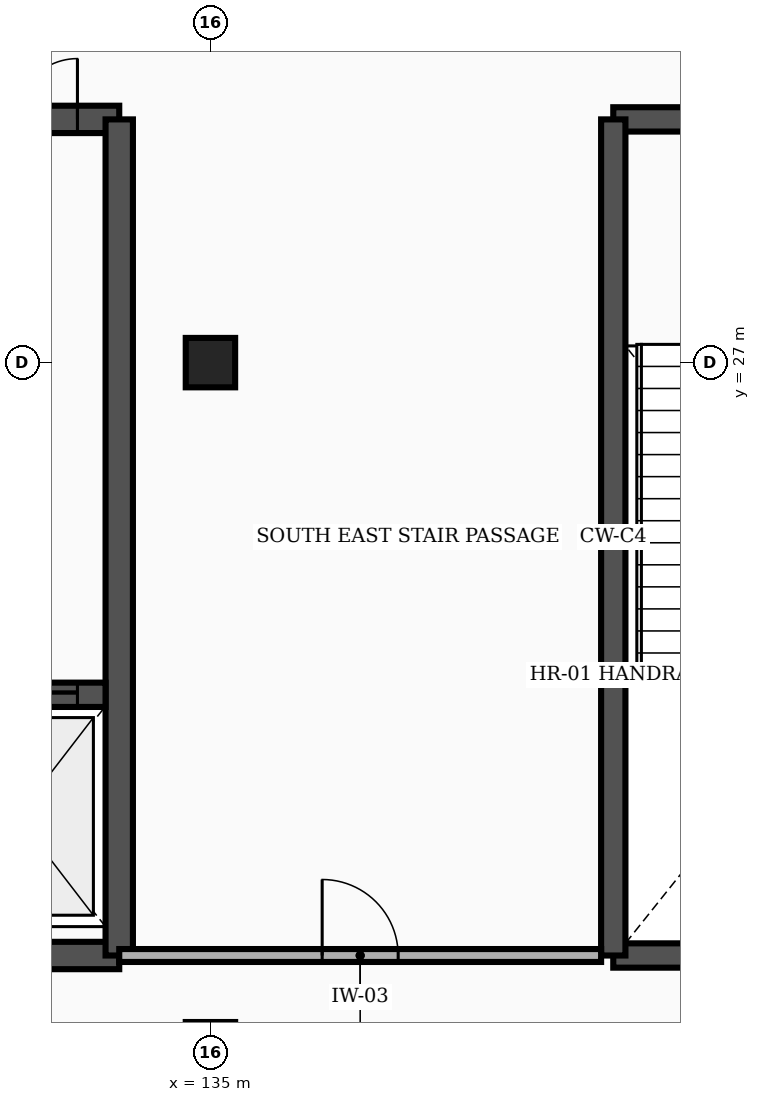
"""IFC4 building model, lengths in metres.
Left out: names, types, materials, properties, quantities, classifications, styles, units other than length and angle.
Written with IfcOpenShell. Run it as: python <this file> out.ifc"""

import sys

from ifc_helpers import new_model, si_unit, direction, frame, frame_2d, origin, origin_2d, place, context, subcontext, project, spatial, rectangle, extrude, element, fill, save


model = new_model("IFC4")
c1 = context("Model", 3, precision=1e-05, world=origin(), true_north=direction((0.0, 1.0)))
c2 = subcontext(c1, "Body", "Model", "MODEL_VIEW")
j1 = project(units=[si_unit("LENGTHUNIT", "METRE"), si_unit("PLANEANGLEUNIT", "RADIAN")], contexts=[c1])
p1 = place(None, origin())
s1 = spatial("IfcSite", under=j1, at=p1, CompositionType="ELEMENT")
p2 = place(p1, origin())
s2 = spatial("IfcBuilding", under=s1, at=p2, CompositionType="ELEMENT")
p3 = place(p2, frame((0.0, 0.0, 11.4)))
s3 = spatial("IfcBuildingStorey", under=s2, at=p3, CompositionType="ELEMENT", Elevation=11.4)
for number, where, z_axis, x_axis in (
    (1, (135.0, 18.0, 0.0), (0.0, 0.0, 1.0), (1.0, 0.0, 0.0)),
    (2, (135.0, 27.0, 0.0), (0.0, 0.0, 1.0), (1.0, 0.0, 0.0)),
):
    element("IfcColumn", number, at=place(p3, frame(where, z_axis=z_axis, x_axis=x_axis)), inside=s3, PredefinedType="COLUMN", context=c2, shape_type="SweptSolid", body=[
        extrude(rectangle(XDim=0.65, YDim=0.65, at=origin_2d()), origin(), (0.0, 0.0, 1.0), 5.4),
    ])
p4 = place(p3, frame((127.2, 19.2, 0.0), z_axis=(0.0, 0.0, 1.0), x_axis=(1.0, 0.0, 0.0)))
e3 = element("IfcWall", 3, at=p4, inside=s3, PredefinedType="SHEAR", context=c2, shape_type="SweptSolid", body=[
    extrude(rectangle(XDim=6.6, YDim=0.36, at=frame_2d((3.3, 0.0))), origin(), (0.0, 0.0, 1.0), 5.15),
])
p5 = place(p3, frame((127.2, 30.2, 0.0), z_axis=(0.0, 0.0, 1.0), x_axis=(1.0, 0.0, 0.0)))
e4 = element("IfcWall", 4, at=p5, inside=s3, PredefinedType="SHEAR", context=c2, shape_type="SweptSolid", body=[
    extrude(rectangle(XDim=6.6, YDim=0.36, at=frame_2d((3.3, 0.0))), origin(), (0.0, 0.0, 1.0), 5.15),
])
p6 = place(p5, frame((4.45, 0.0, 0.0)))
e5 = element("IfcOpeningElement", 5, at=p6, cuts=e4, PredefinedType="OPENING", context=c2, shape_type="SweptSolid", body=[
    extrude(rectangle(XDim=1.6, YDim=2.3, at=frame_2d((0.8, 1.15))), frame((0.0, 0.192, 0.0), z_axis=(0.0, -1.0, 0.0), x_axis=(1.0, 0.0, 0.0)), (0.0, 0.0, 1.0), 0.384),
])
p7 = place(p3, frame((133.8, 19.2, 0.0), z_axis=(0.0, 0.0, 1.0), x_axis=(0.0, 1.0, 0.0)))
e6 = element("IfcWall", 6, at=p7, inside=s3, PredefinedType="SHEAR", context=c2, shape_type="SweptSolid", body=[
    extrude(rectangle(XDim=11.0, YDim=0.36, at=frame_2d((5.5, 0.0))), origin(), (0.0, 0.0, 1.0), 5.15),
])
p8 = place(p3, frame((131.3, 22.63, 0.0), z_axis=(0.0, 0.0, 1.0), x_axis=(1.0, 0.0, 0.0)))
e7 = element("IfcWall", 7, at=p8, inside=s3, PredefinedType="SHEAR", context=c2, shape_type="SweptSolid", body=[
    extrude(rectangle(XDim=2.32, YDim=0.32, at=frame_2d((1.16, 0.0))), origin(), (0.0, 0.0, 1.0), 5.15),
])
p9 = place(p8, frame((0.3, 0.0, 0.0)))
e8 = element("IfcOpeningElement", 8, at=p9, cuts=e7, PredefinedType="OPENING", context=c2, shape_type="SweptSolid", body=[
    extrude(rectangle(XDim=1.65, YDim=2.35, at=frame_2d((0.825, 1.175))), frame((0.0, 0.172, 0.0), z_axis=(0.0, -1.0, 0.0), x_axis=(1.0, 0.0, 0.0)), (0.0, 0.0, 1.0), 0.344),
])
p10 = place(p3, frame((140.3, 19.2, 0.0), z_axis=(0.0, 0.0, 1.0), x_axis=(1.0, 0.0, 0.0)))
e9 = element("IfcWall", 9, at=p10, inside=s3, PredefinedType="SHEAR", context=c2, shape_type="SweptSolid", body=[
    extrude(rectangle(XDim=6.6, YDim=0.32, at=frame_2d((3.3, 0.0))), origin(), (0.0, 0.0, 1.0), 5.15),
])
p11 = place(p3, frame((140.3, 30.2, 0.0), z_axis=(0.0, 0.0, 1.0), x_axis=(1.0, 0.0, 0.0)))
e10 = element("IfcWall", 10, at=p11, inside=s3, PredefinedType="SHEAR", context=c2, shape_type="SweptSolid", body=[
    extrude(rectangle(XDim=6.6, YDim=0.32, at=frame_2d((3.3, 0.0))), origin(), (0.0, 0.0, 1.0), 5.15),
])
p12 = place(p11, frame((2.1, 0.0, 0.0)))
e11 = element("IfcOpeningElement", 11, at=p12, cuts=e10, PredefinedType="OPENING", context=c2, shape_type="SweptSolid", body=[
    extrude(rectangle(XDim=2.4, YDim=2.25, at=frame_2d((1.2, 1.125))), frame((0.0, 0.172, 0.0), z_axis=(0.0, -1.0, 0.0), x_axis=(1.0, 0.0, 0.0)), (0.0, 0.0, 1.0), 0.344),
])
p13 = place(p3, frame((140.3, 19.2, 0.0), z_axis=(0.0, 0.0, 1.0), x_axis=(0.0, 1.0, 0.0)))
e12 = element("IfcWall", 12, at=p13, inside=s3, PredefinedType="SHEAR", context=c2, shape_type="SweptSolid", body=[
    extrude(rectangle(XDim=11.0, YDim=0.32, at=frame_2d((5.5, 0.0))), origin(), (0.0, 0.0, 1.0), 5.15),
])
p14 = place(p3, frame((133.8, 19.2, 0.0), z_axis=(0.0, 0.0, 1.0), x_axis=(1.0, 0.0, 0.0)))
e13 = element("IfcWall", 13, at=p14, inside=s3, PredefinedType="PARTITIONING", context=c2, shape_type="SweptSolid", body=[
    extrude(rectangle(XDim=6.34, YDim=0.17, at=frame_2d((3.17, 0.0))), origin(), (0.0, 0.0, 1.0), 5.15),
])
p15 = place(p14, frame((2.67, 0.0, 0.0)))
e14 = element("IfcOpeningElement", 14, at=p15, cuts=e13, PredefinedType="OPENING", context=c2, shape_type="SweptSolid", body=[
    extrude(rectangle(XDim=1.0, YDim=2.15, at=frame_2d((0.5, 1.075))), frame((0.0, 0.097, 0.0), z_axis=(0.0, -1.0, 0.0), x_axis=(1.0, 0.0, 0.0)), (0.0, 0.0, 1.0), 0.194),
])
p16 = place(p9, origin())
e15 = element("IfcDoor", 15, at=p16, inside=s3, OperationType="DOUBLE_DOOR_SLIDING", PredefinedType="DOOR", context=c2, shape_type="SweptSolid", body=[
    extrude(rectangle(XDim=1.65, YDim=2.35, at=frame_2d((0.825, 1.175))), frame((0.0, 0.025, 0.0), z_axis=(0.0, -1.0, 0.0), x_axis=(1.0, 0.0, 0.0)), (0.0, 0.0, 1.0), 0.05),
])
fill(e8, e15)
p17 = place(p6, origin())
e16 = element("IfcDoor", 16, at=p17, inside=s3, OperationType="DOUBLE_DOOR_SINGLE_SWING", PredefinedType="DOOR", context=c2, shape_type="SweptSolid", body=[
    extrude(rectangle(XDim=1.6, YDim=2.3, at=frame_2d((0.8, 1.15))), frame((0.0, 0.025, 0.0), z_axis=(0.0, -1.0, 0.0), x_axis=(1.0, 0.0, 0.0)), (0.0, 0.0, 1.0), 0.05),
])
fill(e5, e16)
p18 = place(p15, origin())
e17 = element("IfcDoor", 17, at=p18, inside=s3, OperationType="SINGLE_SWING_LEFT", PredefinedType="DOOR", context=c2, shape_type="SweptSolid", body=[
    extrude(rectangle(XDim=1.0, YDim=2.15, at=frame_2d((0.5, 1.075))), frame((0.0, 0.025, 0.0), z_axis=(0.0, -1.0, 0.0), x_axis=(1.0, 0.0, 0.0)), (0.0, 0.0, 1.0), 0.05),
])
fill(e14, e17)
save(model, sys.argv[1])
